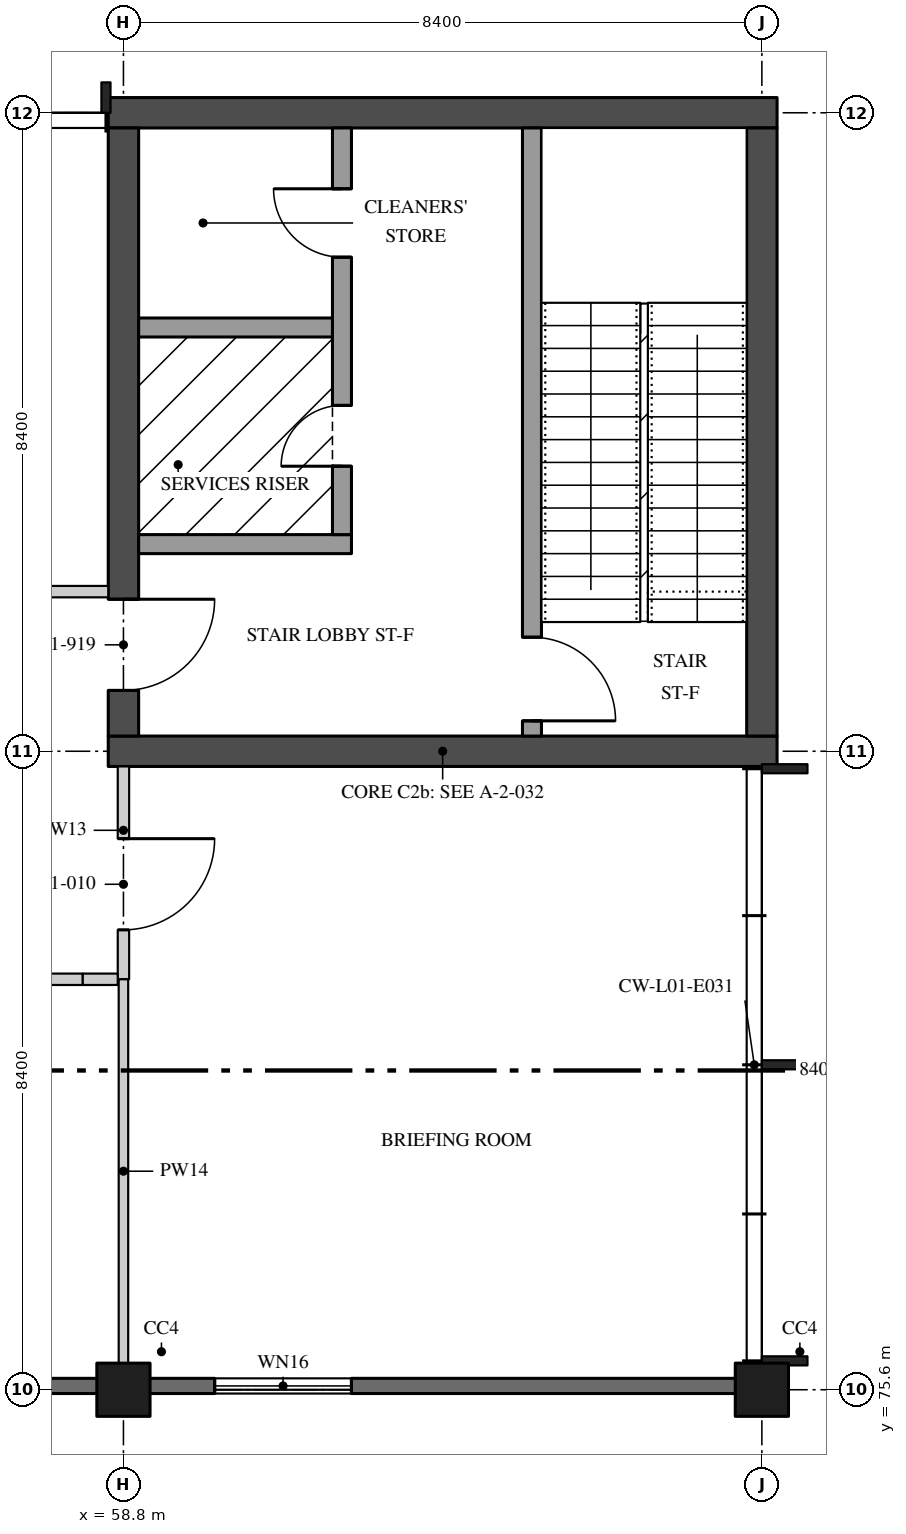
"""IFC4 building model, lengths in metres.
Left out: names, types, materials, properties, quantities, classifications, styles, units other than length and angle.
Written with IfcOpenShell. Run it as: python <this file> out.ifc"""

import sys

from ifc_helpers import new_model, si_unit, direction, frame, frame_2d, origin, origin_2d, place, context, subcontext, project, spatial, rectangle, extrude, element, fill, save


model = new_model("IFC4")
c1 = context("Model", 3, precision=1e-05, world=origin(), true_north=direction((0.0, 1.0)))
c2 = subcontext(c1, "Body", "Model", "MODEL_VIEW")
j1 = project(units=[si_unit("LENGTHUNIT", "METRE"), si_unit("PLANEANGLEUNIT", "RADIAN")], contexts=[c1])
p1 = place(None, origin())
s1 = spatial("IfcSite", under=j1, at=p1, CompositionType="ELEMENT")
p2 = place(p1, origin())
s2 = spatial("IfcBuilding", under=s1, at=p2, CompositionType="ELEMENT")
p3 = place(p2, frame((0.0, 0.0, 5.4)))
s3 = spatial("IfcBuildingStorey", under=s2, at=p3, CompositionType="ELEMENT", Elevation=5.4)
for number, where, z_axis, x_axis in (
    (1, (58.8, 75.6, 0.0), (0.0, 0.0, 1.0), (1.0, 0.0, 0.0)),
    (2, (67.2, 75.6, 0.0), (0.0, 0.0, 1.0), (1.0, 0.0, 0.0)),
):
    element("IfcColumn", number, at=place(p3, frame(where, z_axis=z_axis, x_axis=x_axis)), inside=s3, PredefinedType="COLUMN", context=c2, shape_type="SweptSolid", body=[
        extrude(rectangle(XDim=0.7, YDim=0.7, at=origin_2d()), origin(), (0.0, 0.0, 1.0), 4.37),
    ])
for number, where, z_axis, x_axis in (
    (3, (58.6, 84.0, 0.0), (0.0, 0.0, 1.0), (1.0, 0.0, 0.0)),
    (4, (58.6, 92.4, 0.0), (0.0, 0.0, 1.0), (1.0, 0.0, 0.0)),
):
    element("IfcWall", number, at=place(p3, frame(where, z_axis=z_axis, x_axis=x_axis)), inside=s3, PredefinedType="SHEAR", context=c2, shape_type="SweptSolid", body=[
        extrude(rectangle(XDim=8.8, YDim=0.4, at=frame_2d((4.4, 0.0))), origin(), (0.0, 0.0, 1.0), 4.37),
    ])
p4 = place(p3, frame((58.8, 84.2, 0.0), z_axis=(0.0, 0.0, 1.0), x_axis=(0.0, 1.0, 0.0)))
e5 = element("IfcWall", 5, at=p4, inside=s3, PredefinedType="SHEAR", context=c2, shape_type="SweptSolid", body=[
    extrude(rectangle(XDim=8.0, YDim=0.4, at=frame_2d((4.0, 0.0))), origin(), (0.0, 0.0, 1.0), 4.37),
])
p5 = place(p4, frame((0.6, 0.0, 0.0)))
e6 = element("IfcOpeningElement", 6, at=p5, cuts=e5, PredefinedType="OPENING", context=c2, shape_type="SweptSolid", body=[
    extrude(rectangle(XDim=1.2, YDim=2.1, at=frame_2d((0.6, 1.05))), frame((0.0, 0.21, 0.0), z_axis=(0.0, -1.0, 0.0), x_axis=(1.0, 0.0, 0.0)), (0.0, 0.0, 1.0), 0.42),
])
p6 = place(p3, frame((67.2, 84.2, 0.0), z_axis=(0.0, 0.0, 1.0), x_axis=(0.0, 1.0, 0.0)))
e7 = element("IfcWall", 7, at=p6, inside=s3, PredefinedType="SHEAR", context=c2, shape_type="SweptSolid", body=[
    extrude(rectangle(XDim=8.0, YDim=0.4, at=frame_2d((4.0, 0.0))), origin(), (0.0, 0.0, 1.0), 4.37),
])
p7 = place(p3, frame((64.175, 84.2, 0.0), z_axis=(0.0, 0.0, 1.0), x_axis=(0.0, 1.0, 0.0)))
e8 = element("IfcWall", 8, at=p7, inside=s3, PredefinedType="SOLIDWALL", context=c2, shape_type="SweptSolid", body=[
    extrude(rectangle(XDim=8.0, YDim=0.25, at=frame_2d((4.0, 0.0))), origin(), (0.0, 0.0, 1.0), 4.37),
])
p8 = place(p7, frame((0.2, 0.0, 0.0)))
e9 = element("IfcOpeningElement", 9, at=p8, cuts=e8, PredefinedType="OPENING", context=c2, shape_type="SweptSolid", body=[
    extrude(rectangle(XDim=1.1, YDim=2.1, at=frame_2d((0.55, 1.05))), frame((0.0, 0.135, 0.0), z_axis=(0.0, -1.0, 0.0), x_axis=(1.0, 0.0, 0.0)), (0.0, 0.0, 1.0), 0.27),
])
p9 = place(p3, frame((61.8, 86.725, 0.0), z_axis=(0.0, 0.0, 1.0), x_axis=(-1.0, 0.0, 0.0)))
e10 = element("IfcWall", 10, at=p9, inside=s3, PredefinedType="SOLIDWALL", context=c2, shape_type="SweptSolid", body=[
    extrude(rectangle(XDim=2.8, YDim=0.25, at=frame_2d((1.4, 0.0))), origin(), (0.0, 0.0, 1.0), 4.37),
])
p10 = place(p3, frame((61.675, 86.85, 0.0), z_axis=(0.0, 0.0, 1.0), x_axis=(0.0, 1.0, 0.0)))
e11 = element("IfcWall", 11, at=p10, inside=s3, PredefinedType="SOLIDWALL", context=c2, shape_type="SweptSolid", body=[
    extrude(rectangle(XDim=5.35, YDim=0.25, at=frame_2d((2.675, 0.0))), origin(), (0.0, 0.0, 1.0), 4.37),
])
p11 = place(p10, frame((3.65, 0.0, 0.0)))
e12 = element("IfcOpeningElement", 12, at=p11, cuts=e11, PredefinedType="OPENING", context=c2, shape_type="SweptSolid", body=[
    extrude(rectangle(XDim=0.9, YDim=2.1, at=frame_2d((0.45, 1.05))), frame((0.0, 0.135, 0.0), z_axis=(0.0, -1.0, 0.0), x_axis=(1.0, 0.0, 0.0)), (0.0, 0.0, 1.0), 0.27),
])
p12 = place(p10, frame((0.9, 0.0, 0.0)))
e13 = element("IfcOpeningElement", 13, at=p12, cuts=e11, PredefinedType="OPENING", context=c2, shape_type="SweptSolid", body=[
    extrude(rectangle(XDim=0.8, YDim=2.1, at=frame_2d((0.4, 1.05))), frame((0.0, 0.135, 0.0), z_axis=(0.0, -1.0, 0.0), x_axis=(1.0, 0.0, 0.0)), (0.0, 0.0, 1.0), 0.27),
])
p13 = place(p3, frame((61.55, 89.575, 0.0), z_axis=(0.0, 0.0, 1.0), x_axis=(-1.0, 0.0, 0.0)))
e14 = element("IfcWall", 14, at=p13, inside=s3, PredefinedType="SOLIDWALL", context=c2, shape_type="SweptSolid", body=[
    extrude(rectangle(XDim=2.55, YDim=0.25, at=frame_2d((1.275, 0.0))), origin(), (0.0, 0.0, 1.0), 4.37),
])
p14 = place(p3, frame((58.8, 81.0, 0.0), z_axis=(0.0, 0.0, 1.0), x_axis=(0.0, 1.0, 0.0)))
e15 = element("IfcWall", 15, at=p14, inside=s3, PredefinedType="PARTITIONING", context=c2, shape_type="SweptSolid", body=[
    extrude(rectangle(XDim=2.8, YDim=0.15, at=frame_2d((1.4, 0.0))), origin(), (0.0, 0.0, 1.0), 3.746),
])
p15 = place(p14, frame((0.65, 0.0, 0.0)))
e16 = element("IfcOpeningElement", 16, at=p15, cuts=e15, PredefinedType="OPENING", context=c2, shape_type="SweptSolid", body=[
    extrude(rectangle(XDim=1.2, YDim=2.4, at=frame_2d((0.6, 1.2))), frame((0.0, 0.085, 0.0), z_axis=(0.0, -1.0, 0.0), x_axis=(1.0, 0.0, 0.0)), (0.0, 0.0, 1.0), 0.17),
])
p16 = place(p3, frame((58.8, 75.95, 0.0), z_axis=(0.0, 0.0, 1.0), x_axis=(0.0, 1.0, 0.0)))
e17 = element("IfcWall", 17, at=p16, inside=s3, PredefinedType="PARTITIONING", context=c2, shape_type="SweptSolid", body=[
    extrude(rectangle(XDim=5.05, YDim=0.125, at=frame_2d((2.525, 0.0))), origin(), (0.0, 0.0, 1.0), 3.746),
])
p17 = place(p3, frame((56.23, 81.0, 0.0), z_axis=(0.0, 0.0, 1.0), x_axis=(1.0, 0.0, 0.0)))
e18 = element("IfcWall", 18, at=p17, inside=s3, PredefinedType="PARTITIONING", context=c2, shape_type="SweptSolid", body=[
    extrude(rectangle(XDim=2.035, YDim=0.15, at=frame_2d((1.018, 0.0))), origin(), (0.0, 0.0, 1.0), 4.37),
])
p18 = place(p3, frame((58.265, 81.0, 0.0), z_axis=(0.0, 0.0, 1.0), x_axis=(1.0, 0.0, 0.0)))
e19 = element("IfcWall", 19, at=p18, inside=s3, PredefinedType="PARTITIONING", context=c2, shape_type="SweptSolid", body=[
    extrude(rectangle(XDim=0.46, YDim=0.15, at=frame_2d((0.23, 0.0))), origin(), (0.0, 0.0, 1.0), 3.746),
])
p19 = place(p3, frame((56.475, 86.1, 0.0), z_axis=(0.0, 0.0, 1.0), x_axis=(1.0, 0.0, 0.0)))
e20 = element("IfcWall", 20, at=p19, inside=s3, PredefinedType="PARTITIONING", context=c2, shape_type="SweptSolid", body=[
    extrude(rectangle(XDim=2.125, YDim=0.15, at=frame_2d((1.062, 0.0))), origin(), (0.0, 0.0, 1.0), 4.37),
])
p20 = place(p3, frame((50.73, 75.65, 0.0), z_axis=(0.0, 0.0, 1.0), x_axis=(1.0, 0.0, 0.0)))
e21 = element("IfcWall", 21, at=p20, inside=s3, PredefinedType="SOLIDWALL", context=c2, shape_type="SweptSolid", body=[
    extrude(rectangle(XDim=7.74, YDim=0.2, at=frame_2d((3.87, 0.0))), origin(), (0.0, 0.0, 1.0), 3.746),
])
p21 = place(p20, frame((0.57, 0.0, 0.9)))
e22 = element("IfcOpeningElement", 22, at=p21, cuts=e21, PredefinedType="OPENING", context=c2, shape_type="SweptSolid", body=[
    extrude(rectangle(XDim=2.4, YDim=2.1, at=frame_2d((1.2, 1.05))), frame((0.0, 0.11, 0.0), z_axis=(0.0, -1.0, 0.0), x_axis=(1.0, 0.0, 0.0)), (0.0, 0.0, 1.0), 0.22),
])
p22 = place(p3, frame((59.13, 75.65, 0.0), z_axis=(0.0, 0.0, 1.0), x_axis=(1.0, 0.0, 0.0)))
e23 = element("IfcWall", 23, at=p22, inside=s3, PredefinedType="SOLIDWALL", context=c2, shape_type="SweptSolid", body=[
    extrude(rectangle(XDim=7.74, YDim=0.2, at=frame_2d((3.87, 0.0))), origin(), (0.0, 0.0, 1.0), 3.746),
])
p23 = place(p22, frame((0.87, 0.0, 0.9)))
e24 = element("IfcOpeningElement", 24, at=p23, cuts=e23, PredefinedType="OPENING", context=c2, shape_type="SweptSolid", body=[
    extrude(rectangle(XDim=1.8, YDim=2.1, at=frame_2d((0.9, 1.05))), frame((0.0, 0.11, 0.0), z_axis=(0.0, -1.0, 0.0), x_axis=(1.0, 0.0, 0.0)), (0.0, 0.0, 1.0), 0.22),
])
p24 = place(p11, origin())
e25 = element("IfcDoor", 25, at=p24, inside=s3, OperationType="SINGLE_SWING_LEFT", PredefinedType="DOOR", context=c2, shape_type="SweptSolid", body=[
    extrude(rectangle(XDim=0.9, YDim=2.1, at=frame_2d((0.45, 1.05))), frame((0.0, 0.035, 0.0), z_axis=(0.0, -1.0, 0.0), x_axis=(1.0, 0.0, 0.0)), (0.0, 0.0, 1.0), 0.07),
])
fill(e12, e25)
p25 = place(p5, frame((1.2, 0.0, 0.0), z_axis=(0.0, 0.0, 1.0), x_axis=(-1.0, 0.0, 0.0)))
e26 = element("IfcDoor", 26, at=p25, inside=s3, OperationType="SINGLE_SWING_RIGHT", PredefinedType="DOOR", context=c2, shape_type="SweptSolid", body=[
    extrude(rectangle(XDim=1.2, YDim=2.1, at=frame_2d((0.6, 1.05))), frame((0.0, 0.035, 0.0), z_axis=(0.0, -1.0, 0.0), x_axis=(1.0, 0.0, 0.0)), (0.0, 0.0, 1.0), 0.07),
])
fill(e6, e26)
p26 = place(p12, origin())
e27 = element("IfcDoor", 27, at=p26, inside=s3, OperationType="SINGLE_SWING_RIGHT", PredefinedType="DOOR", context=c2, shape_type="SweptSolid", body=[
    extrude(rectangle(XDim=0.8, YDim=2.1, at=frame_2d((0.4, 1.05))), frame((0.0, 0.035, 0.0), z_axis=(0.0, -1.0, 0.0), x_axis=(1.0, 0.0, 0.0)), (0.0, 0.0, 1.0), 0.07),
])
fill(e13, e27)
p27 = place(p8, frame((1.1, 0.0, 0.0), z_axis=(0.0, 0.0, 1.0), x_axis=(-1.0, 0.0, 0.0)))
e28 = element("IfcDoor", 28, at=p27, inside=s3, OperationType="SINGLE_SWING_LEFT", PredefinedType="DOOR", context=c2, shape_type="SweptSolid", body=[
    extrude(rectangle(XDim=1.1, YDim=2.1, at=frame_2d((0.55, 1.05))), frame((0.0, 0.035, 0.0), z_axis=(0.0, -1.0, 0.0), x_axis=(1.0, 0.0, 0.0)), (0.0, 0.0, 1.0), 0.07),
])
fill(e9, e28)
p28 = place(p15, frame((1.2, 0.0, 0.0), z_axis=(0.0, 0.0, 1.0), x_axis=(-1.0, 0.0, 0.0)))
e29 = element("IfcDoor", 29, at=p28, inside=s3, OperationType="SINGLE_SWING_RIGHT", PredefinedType="DOOR", context=c2, shape_type="SweptSolid", body=[
    extrude(rectangle(XDim=1.2, YDim=2.4, at=frame_2d((0.6, 1.2))), frame((0.0, 0.025, 0.0), z_axis=(0.0, -1.0, 0.0), x_axis=(1.0, 0.0, 0.0)), (0.0, 0.0, 1.0), 0.05),
])
fill(e16, e29)
p29 = place(p23, origin())
e30 = element("IfcWindow", 30, at=p29, inside=s3, PartitioningType="SINGLE_PANEL", PredefinedType="WINDOW", context=c2, shape_type="SweptSolid", body=[
    extrude(rectangle(XDim=1.8, YDim=2.1, at=frame_2d((0.9, 1.05))), frame((0.0, 0.04, 0.0), z_axis=(0.0, -1.0, 0.0), x_axis=(1.0, 0.0, 0.0)), (0.0, 0.0, 1.0), 0.08),
])
fill(e24, e30)
save(model, sys.argv[1])
